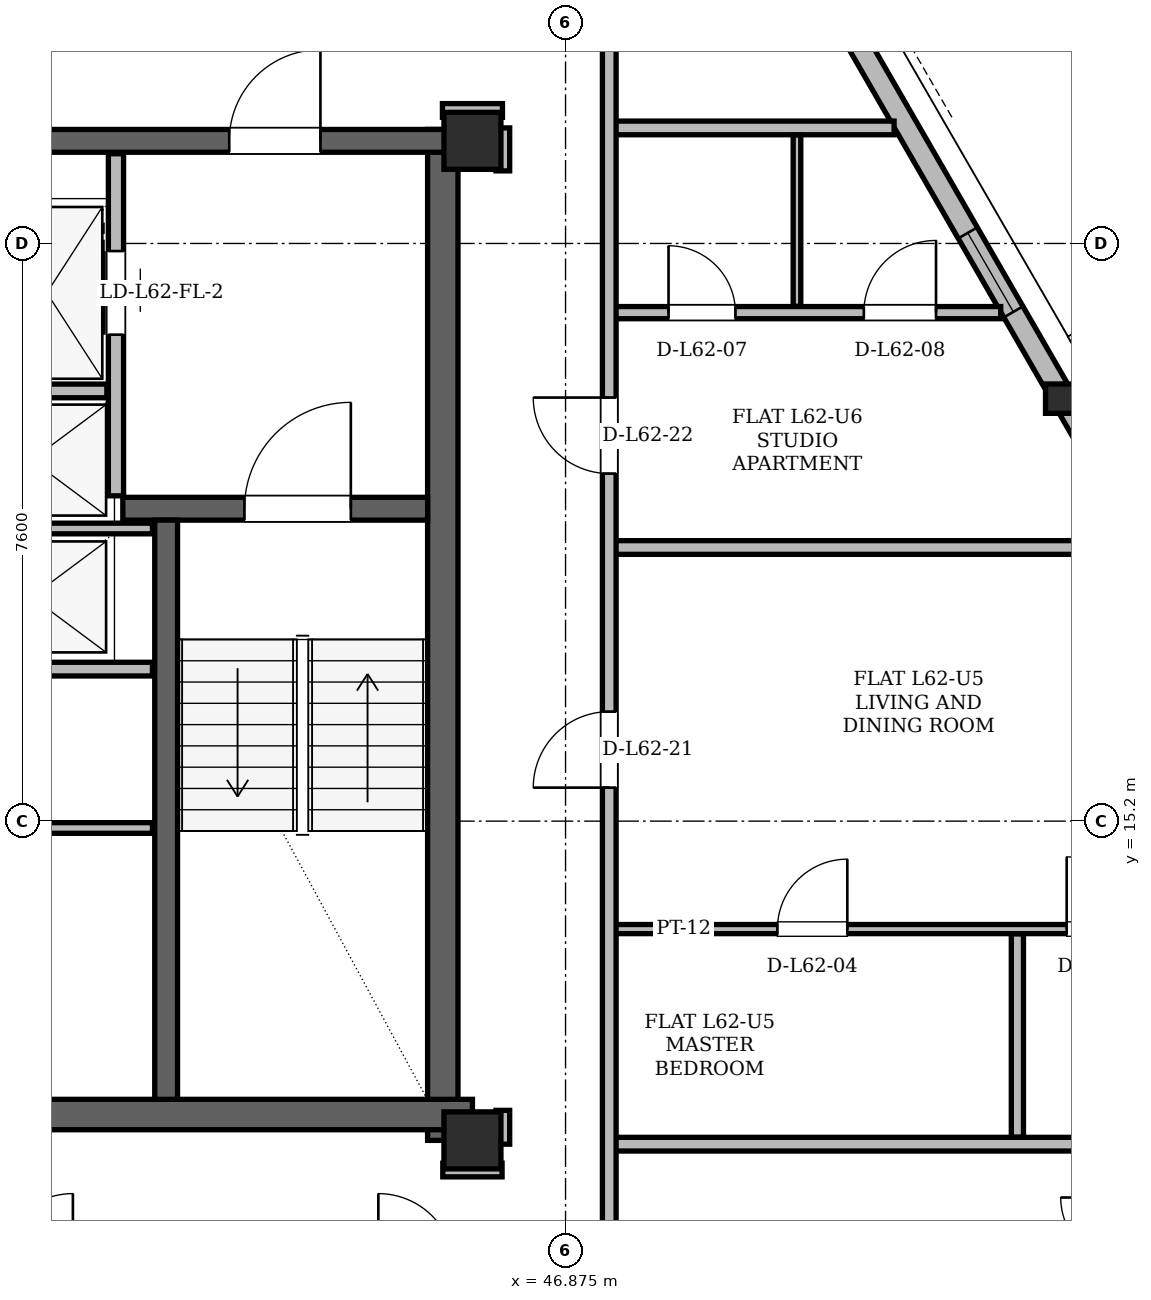
"""IFC4 building model, lengths in metres.
Left out: names, types, materials, properties, quantities, classifications, styles, units other than length and angle.
Written with IfcOpenShell. Run it as: python <this file> out.ifc"""

import sys

from ifc_helpers import new_model, si_unit, direction, frame, frame_2d, origin, origin_2d, place, context, subcontext, project, spatial, rectangle, hollow_rectangle, i_section, extrude, element, fill, save


model = new_model("IFC4")
c1 = context("Model", 3, precision=1e-05, world=origin(), true_north=direction((0.0, 1.0)))
c2 = subcontext(c1, "Body", "Model", "MODEL_VIEW")
j1 = project(units=[si_unit("LENGTHUNIT", "METRE"), si_unit("PLANEANGLEUNIT", "RADIAN")], contexts=[c1])
p1 = place(None, origin())
s1 = spatial("IfcSite", under=j1, at=p1, CompositionType="ELEMENT")
p2 = place(p1, origin())
s2 = spatial("IfcBuilding", under=s1, at=p2, CompositionType="ELEMENT")
p3 = place(p2, frame((0.0, 0.0, 234.3)))
s3 = spatial("IfcBuildingStorey", under=s2, at=p3, CompositionType="ELEMENT", Elevation=234.3)
for number, where, z_axis, x_axis in (
    (1, (45.65, 11.0, 0.0), (0.0, 0.0, 1.0), (1.0, 0.0, 0.0)),
    (2, (45.65, 24.15, 0.0), (0.0, 0.0, 1.0), (1.0, 0.0, 0.0)),
):
    element("IfcColumn", number, at=place(p3, frame(where, z_axis=z_axis, x_axis=x_axis)), inside=s3, PredefinedType="COLUMN", context=c2, shape_type="SweptSolid", body=[
        extrude(hollow_rectangle(XDim=0.75, YDim=0.75, WallThickness=0.06, at=origin_2d()), origin(), (0.0, 0.0, 1.0), 3.6),
    ])
p4 = place(p3, frame((53.414, 20.779, 0.004), z_axis=(-0.013866832544, -0.011351769779, 0.999839411245), x_axis=(0.633444321555, -0.773788273037, 0.0)))
e3 = element("IfcColumn", 3, at=p4, inside=s3, PredefinedType="COLUMN", context=c2, shape_type="SweptSolid", body=[
    extrude(i_section(OverallWidth=0.399, OverallDepth=0.386, WebThickness=0.021, FlangeThickness=0.033, at=origin_2d()), origin(), (0.0, 0.0, 1.0), 3.592),
])
p5 = place(p3, frame((45.26, 11.0, 0.0), z_axis=(0.0, 0.0, 1.0), x_axis=(0.0, 1.0, 0.0)))
e4 = element("IfcWall", 4, at=p5, inside=s3, PredefinedType="SHEAR", context=c2, shape_type="SweptSolid", body=[
    extrude(rectangle(XDim=13.3, YDim=0.4, at=frame_2d((6.65, 0.0))), origin(), (0.0, 0.0, 1.0), 3.38),
])
p6 = place(p3, frame((38.55, 11.34, 0.0), z_axis=(0.0, 0.0, 1.0), x_axis=(1.0, 0.0, 0.0)))
e5 = element("IfcWall", 5, at=p6, inside=s3, PredefinedType="SHEAR", context=c2, shape_type="SweptSolid", body=[
    extrude(rectangle(XDim=7.1, YDim=0.4, at=frame_2d((3.55, 0.0))), origin(), (0.0, 0.0, 1.0), 3.38),
])
p7 = place(p3, frame((29.65, 24.15, 0.0), z_axis=(0.0, 0.0, 1.0), x_axis=(1.0, 0.0, 0.0)))
e6 = element("IfcWall", 6, at=p7, inside=s3, PredefinedType="SHEAR", context=c2, shape_type="SweptSolid", body=[
    extrude(rectangle(XDim=15.7, YDim=0.3, at=frame_2d((7.85, 0.0))), origin(), (0.0, 0.0, 1.0), 3.38),
])
p8 = place(p7, frame((1.7, 0.0, 0.0)))
e7 = element("IfcOpeningElement", 7, at=p8, cuts=e6, PredefinedType="OPENING", context=c2, shape_type="SweptSolid", body=[
    extrude(rectangle(XDim=1.2, YDim=2.2, at=frame_2d((0.6, 1.1))), frame((0.0, 0.15, 0.0), z_axis=(0.0, -1.0, 0.0), x_axis=(1.0, 0.0, 0.0)), (0.0, 0.0, 1.0), 0.3),
])
p9 = place(p7, frame((12.8, 0.0, 0.0)))
e8 = element("IfcOpeningElement", 8, at=p9, cuts=e6, PredefinedType="OPENING", context=c2, shape_type="SweptSolid", body=[
    extrude(rectangle(XDim=1.2, YDim=2.2, at=frame_2d((0.6, 1.1))), frame((0.0, 0.15, 0.0), z_axis=(0.0, -1.0, 0.0), x_axis=(1.0, 0.0, 0.0)), (0.0, 0.0, 1.0), 0.3),
])
p10 = place(p7, frame((7.4, 0.0, 0.0)))
e9 = element("IfcOpeningElement", 9, at=p10, cuts=e6, PredefinedType="OPENING", context=c2, shape_type="SweptSolid", body=[
    extrude(rectangle(XDim=0.9, YDim=2.05, at=frame_2d((0.45, 1.025))), frame((0.0, 0.15, 0.0), z_axis=(0.0, -1.0, 0.0), x_axis=(1.0, 0.0, 0.0)), (0.0, 0.0, 1.0), 0.3),
])
p11 = place(p3, frame((41.05, 19.31, 0.0), z_axis=(0.0, 0.0, 1.0), x_axis=(1.0, 0.0, 0.0)))
e10 = element("IfcWall", 10, at=p11, inside=s3, PredefinedType="SHEAR", context=c2, shape_type="SweptSolid", body=[
    extrude(rectangle(XDim=4.01, YDim=0.3, at=frame_2d((2.005, 0.0))), origin(), (0.0, 0.0, 1.0), 3.38),
])
p12 = place(p11, frame((1.6, 0.0, 0.0)))
e11 = element("IfcOpeningElement", 11, at=p12, cuts=e10, PredefinedType="OPENING", context=c2, shape_type="SweptSolid", body=[
    extrude(rectangle(XDim=1.4, YDim=2.2, at=frame_2d((0.7, 1.1))), frame((0.0, 0.15, 0.0), z_axis=(0.0, -1.0, 0.0), x_axis=(1.0, 0.0, 0.0)), (0.0, 0.0, 1.0), 0.3),
])
p13 = place(p3, frame((41.62, 11.54, 0.0), z_axis=(0.0, 0.0, 1.0), x_axis=(0.0, 1.0, 0.0)))
e12 = element("IfcWall", 12, at=p13, inside=s3, PredefinedType="SHEAR", context=c2, shape_type="SweptSolid", body=[
    extrude(rectangle(XDim=7.62, YDim=0.3, at=frame_2d((3.81, 0.0))), origin(), (0.0, 0.0, 1.0), 3.38),
])
p14 = place(p3, frame((58.942, 11.205, 0.0), z_axis=(0.0, 0.0, 1.0), x_axis=(-0.500000614513, 0.866025048995, 0.0)))
e13 = element("IfcWall", 13, at=p14, inside=s3, PredefinedType="SOLIDWALL", context=c2, shape_type="SweptSolid", body=[
    extrude(rectangle(XDim=36.848, YDim=0.29, at=frame_2d((18.424, 0.0))), origin(), (0.0, 0.0, 1.0), 2.677),
])
p15 = place(p14, frame((7.615, 0.0, 0.0)))
e14 = element("IfcOpeningElement", 14, at=p15, cuts=e13, PredefinedType="OPENING", context=c2, shape_type="SweptSolid", body=[
    extrude(rectangle(XDim=1.5, YDim=2.2, at=frame_2d((0.75, 1.1))), frame((0.0, 0.145, 0.0), z_axis=(0.0, -1.0, 0.0), x_axis=(1.0, 0.0, 0.0)), (0.0, 0.0, 1.0), 0.29),
])
p16 = place(p14, frame((28.658, 0.0, 0.0)))
e15 = element("IfcOpeningElement", 15, at=p16, cuts=e13, PredefinedType="OPENING", context=c2, shape_type="SweptSolid", body=[
    extrude(rectangle(XDim=1.3, YDim=2.2, at=frame_2d((0.65, 1.1))), frame((0.0, 0.145, 0.0), z_axis=(0.0, -1.0, 0.0), x_axis=(1.0, 0.0, 0.0)), (0.0, 0.0, 1.0), 0.29),
])
p17 = place(p14, frame((3.643, 0.0, 0.85)))
e16 = element("IfcOpeningElement", 16, at=p17, cuts=e13, PredefinedType="OPENING", context=c2, shape_type="SweptSolid", body=[
    extrude(rectangle(XDim=1.2, YDim=1.48, at=frame_2d((0.6, 0.74))), frame((0.0, 0.145, 0.0), z_axis=(0.0, -1.0, 0.0), x_axis=(1.0, 0.0, 0.0)), (0.0, 0.0, 1.0), 0.29),
])
p18 = place(p14, frame((1.09, 0.0, 0.85)))
e17 = element("IfcOpeningElement", 17, at=p18, cuts=e13, PredefinedType="OPENING", context=c2, shape_type="SweptSolid", body=[
    extrude(rectangle(XDim=1.6, YDim=1.7, at=frame_2d((0.8, 0.85))), frame((0.0, 0.145, 0.0), z_axis=(0.0, -1.0, 0.0), x_axis=(1.0, 0.0, 0.0)), (0.0, 0.0, 1.0), 0.29),
])
p19 = place(p14, frame((34.714, 0.0, 0.85)))
e18 = element("IfcOpeningElement", 18, at=p19, cuts=e13, PredefinedType="OPENING", context=c2, shape_type="SweptSolid", body=[
    extrude(rectangle(XDim=1.2, YDim=1.48, at=frame_2d((0.6, 0.74))), frame((0.0, 0.145, 0.0), z_axis=(0.0, -1.0, 0.0), x_axis=(1.0, 0.0, 0.0)), (0.0, 0.0, 1.0), 0.29),
])
p20 = place(p14, frame((31.648, 0.0, 0.85)))
e19 = element("IfcOpeningElement", 19, at=p20, cuts=e13, PredefinedType="OPENING", context=c2, shape_type="SweptSolid", body=[
    extrude(rectangle(XDim=1.2, YDim=1.48, at=frame_2d((0.6, 0.74))), frame((0.0, 0.145, 0.0), z_axis=(0.0, -1.0, 0.0), x_axis=(1.0, 0.0, 0.0)), (0.0, 0.0, 1.0), 0.29),
])
p21 = place(p14, frame((16.738, 0.0, 0.85)))
e20 = element("IfcOpeningElement", 20, at=p21, cuts=e13, PredefinedType="OPENING", context=c2, shape_type="SweptSolid", body=[
    extrude(rectangle(XDim=2.2, YDim=1.717, at=frame_2d((1.1, 0.858))), frame((0.0, 0.145, 0.0), z_axis=(0.0, -1.0, 0.0), x_axis=(1.0, 0.0, 0.0)), (0.0, 0.0, 1.0), 0.29),
])
p22 = place(p14, frame((22.794, 0.0, 0.85)))
e21 = element("IfcOpeningElement", 21, at=p22, cuts=e13, PredefinedType="OPENING", context=c2, shape_type="SweptSolid", body=[
    extrude(rectangle(XDim=1.6, YDim=1.7, at=frame_2d((0.8, 0.85))), frame((0.0, 0.145, 0.0), z_axis=(0.0, -1.0, 0.0), x_axis=(1.0, 0.0, 0.0)), (0.0, 0.0, 1.0), 0.29),
])
p23 = place(p14, frame((12.349, 0.0, 0.85)))
e22 = element("IfcOpeningElement", 22, at=p23, cuts=e13, PredefinedType="OPENING", context=c2, shape_type="SweptSolid", body=[
    extrude(rectangle(XDim=1.2, YDim=1.48, at=frame_2d((0.6, 0.74))), frame((0.0, 0.145, 0.0), z_axis=(0.0, -1.0, 0.0), x_axis=(1.0, 0.0, 0.0)), (0.0, 0.0, 1.0), 0.29),
])
p24 = place(p3, frame((40.96, 19.48, 0.0), z_axis=(0.0, 0.0, 1.0), x_axis=(0.0, 1.0, 0.0)))
e23 = element("IfcWall", 23, at=p24, inside=s3, PredefinedType="PARTITIONING", context=c2, shape_type="SweptSolid", body=[
    extrude(rectangle(XDim=4.5, YDim=0.2, at=frame_2d((2.25, 0.0))), origin(), (0.0, 0.0, 1.0), 3.38),
])
p25 = place(p24, frame((2.12, 0.0, 0.0)))
e24 = element("IfcOpeningElement", 24, at=p25, cuts=e23, PredefinedType="OPENING", context=c2, shape_type="SweptSolid", body=[
    extrude(rectangle(XDim=1.1, YDim=2.2, at=frame_2d((0.55, 1.1))), frame((0.0, 0.1, 0.0), z_axis=(0.0, -1.0, 0.0), x_axis=(1.0, 0.0, 0.0)), (0.0, 0.0, 1.0), 0.2),
])
p26 = place(p3, frame((39.26, 20.86, 0.0), z_axis=(0.0, 0.0, 1.0), x_axis=(1.0, 0.0, 0.0)))
e25 = element("IfcWall", 25, at=p26, inside=s3, PredefinedType="PARTITIONING", context=c2, shape_type="SweptSolid", body=[
    extrude(rectangle(XDim=1.58, YDim=0.18, at=frame_2d((0.79, 0.0))), origin(), (0.0, 0.0, 1.0), 3.38),
])
p27 = place(p3, frame((38.78, 17.2, 0.0), z_axis=(0.0, 0.0, 1.0), x_axis=(1.0, 0.0, 0.0)))
e26 = element("IfcWall", 26, at=p27, inside=s3, PredefinedType="PARTITIONING", context=c2, shape_type="SweptSolid", body=[
    extrude(rectangle(XDim=2.66, YDim=0.18, at=frame_2d((1.33, 0.0))), origin(), (0.0, 0.0, 1.0), 3.38),
])
for number, where, z_axis, x_axis in (
    (27, (38.78, 19.05, 0.0), (0.0, 0.0, 1.0), (1.0, 0.0, 0.0)),
    (28, (38.78, 15.11, 0.0), (0.0, 0.0, 1.0), (1.0, 0.0, 0.0)),
):
    element("IfcWall", number, at=place(p3, frame(where, z_axis=z_axis, x_axis=x_axis)), inside=s3, PredefinedType="PARTITIONING", context=c2, shape_type="SweptSolid", body=[
        extrude(rectangle(XDim=2.66, YDim=0.14, at=frame_2d((1.33, 0.0))), origin(), (0.0, 0.0, 1.0), 3.38),
    ])
p28 = place(p3, frame((45.26, 10.61, 0.0), z_axis=(0.0, 0.0, 1.0), x_axis=(1.0, 0.0, 0.0)))
e29 = element("IfcWall", 29, at=p28, inside=s3, PredefinedType="PARTITIONING", context=c2, shape_type="SweptSolid", body=[
    extrude(rectangle(XDim=0.78, YDim=0.18, at=frame_2d((0.39, 0.0))), origin(), (0.0, 0.0, 1.0), 3.38),
])
p29 = place(p3, frame((47.45, 10.95, 0.0), z_axis=(0.0, 0.0, 1.0), x_axis=(1.0, 0.0, 0.0)))
e30 = element("IfcWall", 30, at=p29, inside=s3, PredefinedType="PARTITIONING", context=c2, shape_type="SweptSolid", body=[
    extrude(rectangle(XDim=11.105, YDim=0.18, at=frame_2d((5.553, 0.0))), origin(), (0.0, 0.0, 1.0), 2.913),
])
p30 = place(p3, frame((47.4, 13.78, 0.0), z_axis=(0.0, 0.0, 1.0), x_axis=(1.0, 0.0, 0.0)))
e31 = element("IfcWall", 31, at=p30, inside=s3, PredefinedType="PARTITIONING", context=c2, shape_type="SweptSolid", body=[
    extrude(rectangle(XDim=9.883, YDim=0.12, at=frame_2d((4.941, 0.0))), origin(), (0.0, 0.0, 1.0), 3.38),
])
p31 = place(p30, frame((2.262, 0.0, 0.0)))
e32 = element("IfcOpeningElement", 32, at=p31, cuts=e31, PredefinedType="OPENING", context=c2, shape_type="SweptSolid", body=[
    extrude(rectangle(XDim=0.92, YDim=2.12, at=frame_2d((0.46, 1.06))), frame((0.0, 0.06, 0.0), z_axis=(0.0, -1.0, 0.0), x_axis=(1.0, 0.0, 0.0)), (0.0, 0.0, 1.0), 0.12),
])
p32 = place(p30, frame((6.069, 0.0, 0.0)))
e33 = element("IfcOpeningElement", 33, at=p32, cuts=e31, PredefinedType="OPENING", context=c2, shape_type="SweptSolid", body=[
    extrude(rectangle(XDim=0.95, YDim=2.1, at=frame_2d((0.475, 1.05))), frame((0.0, 0.06, 0.0), z_axis=(0.0, -1.0, 0.0), x_axis=(1.0, 0.0, 0.0)), (0.0, 0.0, 1.0), 0.12),
])
p33 = place(p30, frame((8.348, 0.0, 0.0)))
e34 = element("IfcOpeningElement", 34, at=p33, cuts=e31, PredefinedType="OPENING", context=c2, shape_type="SweptSolid", body=[
    extrude(rectangle(XDim=0.88, YDim=2.08, at=frame_2d((0.44, 1.04))), frame((0.0, 0.06, 0.0), z_axis=(0.0, -1.0, 0.0), x_axis=(1.0, 0.0, 0.0)), (0.0, 0.0, 1.0), 0.12),
])
p34 = place(p3, frame((47.45, 18.8, 0.0), z_axis=(0.0, 0.0, 1.0), x_axis=(1.0, 0.0, 0.0)))
e35 = element("IfcWall", 35, at=p34, inside=s3, PredefinedType="PARTITIONING", context=c2, shape_type="SweptSolid", body=[
    extrude(rectangle(XDim=6.935, YDim=0.18, at=frame_2d((3.467, 0.0))), origin(), (0.0, 0.0, 1.0), 3.38),
])
p35 = place(p3, frame((47.4, 21.89, 0.0), z_axis=(0.0, 0.0, 1.0), x_axis=(1.0, 0.0, 0.0)))
e36 = element("IfcWall", 36, at=p35, inside=s3, PredefinedType="PARTITIONING", context=c2, shape_type="SweptSolid", body=[
    extrude(rectangle(XDim=5.201, YDim=0.16, at=frame_2d((2.6, 0.0))), origin(), (0.0, 0.0, 1.0), 3.38),
])
p36 = place(p35, frame((0.83, 0.0, 0.0)))
e37 = element("IfcOpeningElement", 37, at=p36, cuts=e36, PredefinedType="OPENING", context=c2, shape_type="SweptSolid", body=[
    extrude(rectangle(XDim=0.88, YDim=2.08, at=frame_2d((0.44, 1.04))), frame((0.0, 0.08, 0.0), z_axis=(0.0, -1.0, 0.0), x_axis=(1.0, 0.0, 0.0)), (0.0, 0.0, 1.0), 0.16),
])
p37 = place(p35, frame((3.399, 0.0, 0.0)))
e38 = element("IfcOpeningElement", 38, at=p37, cuts=e36, PredefinedType="OPENING", context=c2, shape_type="SweptSolid", body=[
    extrude(rectangle(XDim=0.95, YDim=2.1, at=frame_2d((0.475, 1.05))), frame((0.0, 0.08, 0.0), z_axis=(0.0, -1.0, 0.0), x_axis=(1.0, 0.0, 0.0)), (0.0, 0.0, 1.0), 0.16),
])
p38 = place(p3, frame((47.45, 24.32, 0.0), z_axis=(0.0, 0.0, 1.0), x_axis=(1.0, 0.0, 0.0)))
e39 = element("IfcWall", 39, at=p38, inside=s3, PredefinedType="PARTITIONING", context=c2, shape_type="SweptSolid", body=[
    extrude(rectangle(XDim=3.748, YDim=0.18, at=frame_2d((1.874, 0.0))), origin(), (0.0, 0.0, 1.0), 3.38),
])
p39 = place(p3, frame((45.255, 24.55, 0.0), z_axis=(0.0, 0.0, 1.0), x_axis=(1.0, 0.0, 0.0)))
e40 = element("IfcWall", 40, at=p39, inside=s3, PredefinedType="PARTITIONING", context=c2, shape_type="SweptSolid", body=[
    extrude(rectangle(XDim=0.79, YDim=0.18, at=frame_2d((0.395, 0.0))), origin(), (0.0, 0.0, 1.0), 2.913),
])
p40 = place(p3, frame((46.05, 10.95, 0.0), z_axis=(0.0, 0.0, 1.0), x_axis=(0.0, 1.0, 0.0)))
e41 = element("IfcWall", 41, at=p40, inside=s3, PredefinedType="PARTITIONING", context=c2, shape_type="SweptSolid", body=[
    extrude(rectangle(XDim=0.445, YDim=0.18, at=frame_2d((0.223, 0.0))), origin(), (0.0, 0.0, 1.0), 2.913),
])
p41 = place(p3, frame((46.05, 23.755, 0.0), z_axis=(0.0, 0.0, 1.0), x_axis=(0.0, 1.0, 0.0)))
e42 = element("IfcWall", 42, at=p41, inside=s3, PredefinedType="PARTITIONING", context=c2, shape_type="SweptSolid", body=[
    extrude(rectangle(XDim=0.565, YDim=0.18, at=frame_2d((0.283, 0.0))), origin(), (0.0, 0.0, 1.0), 3.38),
])
p42 = place(p3, frame((47.45, 9.394, 0.0), z_axis=(0.0, 0.0, 1.0), x_axis=(0.0, 1.0, 0.0)))
e43 = element("IfcWall", 43, at=p42, inside=s3, PredefinedType="PARTITIONING", context=c2, shape_type="SweptSolid", body=[
    extrude(rectangle(XDim=16.482, YDim=0.18, at=frame_2d((8.241, 0.0))), origin(), (0.0, 0.0, 1.0), 2.913),
])
p43 = place(p42, frame((6.247, 0.0, 0.0)))
e44 = element("IfcOpeningElement", 44, at=p43, cuts=e43, PredefinedType="OPENING", context=c2, shape_type="SweptSolid", body=[
    extrude(rectangle(XDim=1.0, YDim=2.18, at=frame_2d((0.5, 1.09))), frame((0.0, 0.09, 0.0), z_axis=(0.0, -1.0, 0.0), x_axis=(1.0, 0.0, 0.0)), (0.0, 0.0, 1.0), 0.18),
])
p44 = place(p42, frame((10.379, 0.0, 0.0)))
e45 = element("IfcOpeningElement", 45, at=p44, cuts=e43, PredefinedType="OPENING", context=c2, shape_type="SweptSolid", body=[
    extrude(rectangle(XDim=1.0, YDim=2.18, at=frame_2d((0.5, 1.09))), frame((0.0, 0.09, 0.0), z_axis=(0.0, -1.0, 0.0), x_axis=(1.0, 0.0, 0.0)), (0.0, 0.0, 1.0), 0.18),
])
p45 = place(p3, frame((49.92, 21.974, 0.0), z_axis=(0.0, 0.0, 1.0), x_axis=(0.0, 1.0, 0.0)))
e46 = element("IfcWall", 46, at=p45, inside=s3, PredefinedType="PARTITIONING", context=c2, shape_type="SweptSolid", body=[
    extrude(rectangle(XDim=2.252, YDim=0.1, at=frame_2d((1.126, 0.0))), origin(), (0.0, 0.0, 1.0), 3.38),
])
p46 = place(p3, frame((52.82, 11.044, 0.0), z_axis=(0.0, 0.0, 1.0), x_axis=(0.0, 1.0, 0.0)))
e47 = element("IfcWall", 47, at=p46, inside=s3, PredefinedType="PARTITIONING", context=c2, shape_type="SweptSolid", body=[
    extrude(rectangle(XDim=2.672, YDim=0.16, at=frame_2d((1.336, 0.0))), origin(), (0.0, 0.0, 1.0), 3.38),
])
p47 = place(p23, origin())
e48 = element("IfcWindow", 48, at=p47, inside=s3, PartitioningType="SINGLE_PANEL", PredefinedType="WINDOW", context=c2, shape_type="SweptSolid", body=[
    extrude(rectangle(XDim=1.2, YDim=1.48, at=frame_2d((0.6, 0.74))), frame((0.0, 0.03, 0.0), z_axis=(0.0, -1.0, 0.0), x_axis=(1.0, 0.0, 0.0)), (0.0, 0.0, 1.0), 0.06),
])
fill(e22, e48)
p48 = place(p25, origin())
e49 = element("IfcDoor", 49, at=p48, inside=s3, OperationType="SLIDING_TO_RIGHT", PredefinedType="DOOR", context=c2, shape_type="SweptSolid", body=[
    extrude(rectangle(XDim=1.1, YDim=2.2, at=frame_2d((0.55, 1.1))), frame((0.0, 0.025, 0.0), z_axis=(0.0, -1.0, 0.0), x_axis=(1.0, 0.0, 0.0)), (0.0, 0.0, 1.0), 0.05),
])
fill(e24, e49)
p49 = place(p12, origin())
e50 = element("IfcDoor", 50, at=p49, inside=s3, OperationType="SINGLE_SWING_RIGHT", PredefinedType="DOOR", context=c2, shape_type="SweptSolid", body=[
    extrude(rectangle(XDim=1.4, YDim=2.2, at=frame_2d((0.7, 1.1))), frame((0.0, 0.025, 0.0), z_axis=(0.0, -1.0, 0.0), x_axis=(1.0, 0.0, 0.0)), (0.0, 0.0, 1.0), 0.05),
])
fill(e11, e50)
p50 = place(p9, origin())
e51 = element("IfcDoor", 51, at=p50, inside=s3, OperationType="SINGLE_SWING_RIGHT", PredefinedType="DOOR", context=c2, shape_type="SweptSolid", body=[
    extrude(rectangle(XDim=1.2, YDim=2.2, at=frame_2d((0.6, 1.1))), frame((0.0, 0.025, 0.0), z_axis=(0.0, -1.0, 0.0), x_axis=(1.0, 0.0, 0.0)), (0.0, 0.0, 1.0), 0.05),
])
fill(e8, e51)
p51 = place(p31, origin())
e52 = element("IfcDoor", 52, at=p51, inside=s3, OperationType="SINGLE_SWING_RIGHT", PredefinedType="DOOR", context=c2, shape_type="SweptSolid", body=[
    extrude(rectangle(XDim=0.92, YDim=2.12, at=frame_2d((0.46, 1.06))), frame((0.0, 0.025, 0.0), z_axis=(0.0, -1.0, 0.0), x_axis=(1.0, 0.0, 0.0)), (0.0, 0.0, 1.0), 0.05),
])
fill(e32, e52)
p52 = place(p32, origin())
e53 = element("IfcDoor", 53, at=p52, inside=s3, OperationType="SINGLE_SWING_LEFT", PredefinedType="DOOR", context=c2, shape_type="SweptSolid", body=[
    extrude(rectangle(XDim=0.95, YDim=2.1, at=frame_2d((0.475, 1.05))), frame((0.0, 0.025, 0.0), z_axis=(0.0, -1.0, 0.0), x_axis=(1.0, 0.0, 0.0)), (0.0, 0.0, 1.0), 0.05),
])
fill(e33, e53)
p53 = place(p36, origin())
e54 = element("IfcDoor", 54, at=p53, inside=s3, OperationType="SINGLE_SWING_LEFT", PredefinedType="DOOR", context=c2, shape_type="SweptSolid", body=[
    extrude(rectangle(XDim=0.88, YDim=2.08, at=frame_2d((0.44, 1.04))), frame((0.0, 0.025, 0.0), z_axis=(0.0, -1.0, 0.0), x_axis=(1.0, 0.0, 0.0)), (0.0, 0.0, 1.0), 0.05),
])
fill(e37, e54)
p54 = place(p37, origin())
e55 = element("IfcDoor", 55, at=p54, inside=s3, OperationType="SINGLE_SWING_RIGHT", PredefinedType="DOOR", context=c2, shape_type="SweptSolid", body=[
    extrude(rectangle(XDim=0.95, YDim=2.1, at=frame_2d((0.475, 1.05))), frame((0.0, 0.025, 0.0), z_axis=(0.0, -1.0, 0.0), x_axis=(1.0, 0.0, 0.0)), (0.0, 0.0, 1.0), 0.05),
])
fill(e38, e55)
p55 = place(p43, origin())
e56 = element("IfcDoor", 56, at=p55, inside=s3, OperationType="SINGLE_SWING_LEFT", PredefinedType="DOOR", context=c2, shape_type="SweptSolid", body=[
    extrude(rectangle(XDim=1.0, YDim=2.18, at=frame_2d((0.5, 1.09))), frame((0.0, 0.025, 0.0), z_axis=(0.0, -1.0, 0.0), x_axis=(1.0, 0.0, 0.0)), (0.0, 0.0, 1.0), 0.05),
])
fill(e44, e56)
p56 = place(p44, origin())
e57 = element("IfcDoor", 57, at=p56, inside=s3, OperationType="SINGLE_SWING_RIGHT", PredefinedType="DOOR", context=c2, shape_type="SweptSolid", body=[
    extrude(rectangle(XDim=1.0, YDim=2.18, at=frame_2d((0.5, 1.09))), frame((0.0, 0.025, 0.0), z_axis=(0.0, -1.0, 0.0), x_axis=(1.0, 0.0, 0.0)), (0.0, 0.0, 1.0), 0.05),
])
fill(e45, e57)
save(model, sys.argv[1])
